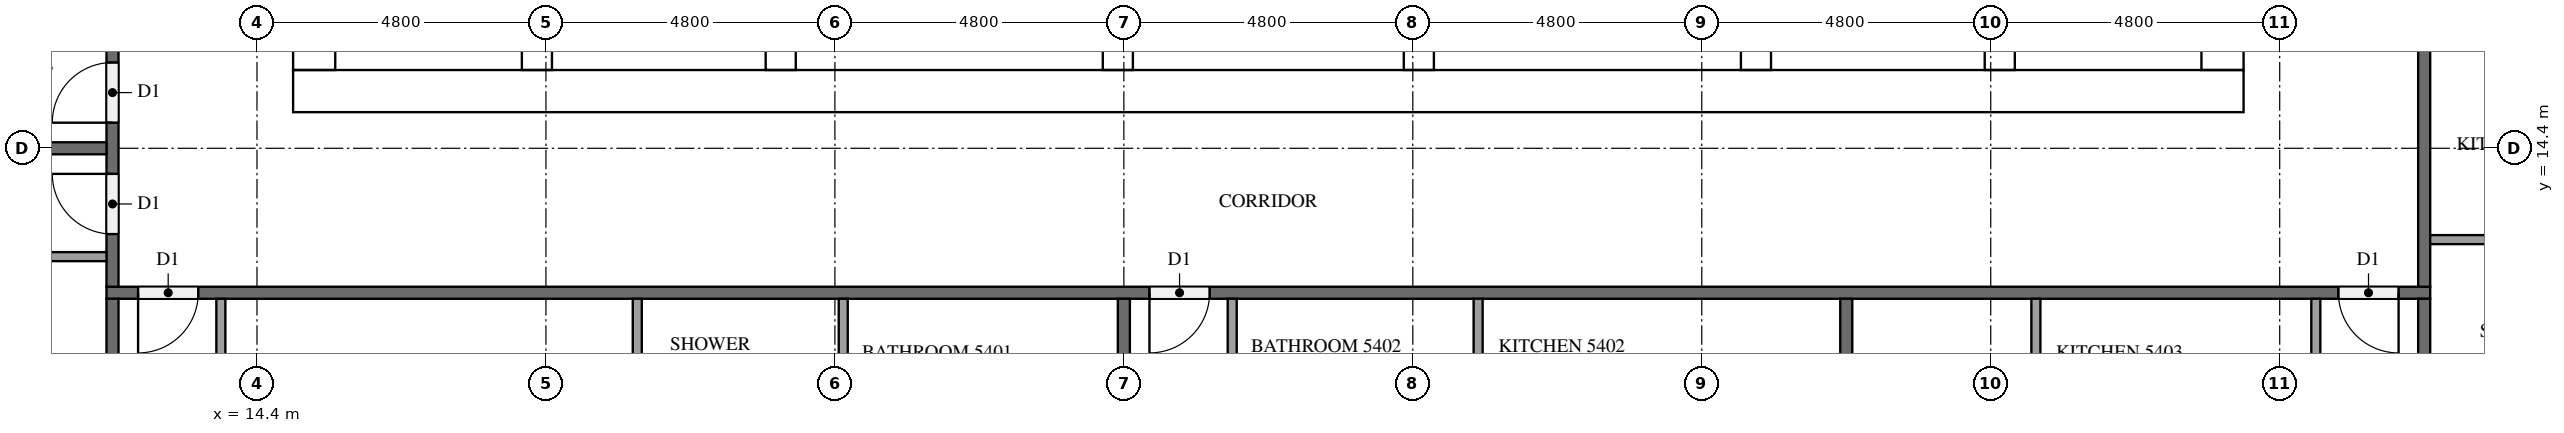
"""IFC4 building model, lengths in metres.
Left out: names, types, materials, properties, quantities, classifications, styles, units other than length and angle.
Written with IfcOpenShell. Run it as: python <this file> out.ifc"""

import sys

from ifc_helpers import new_model, si_unit, direction, frame, frame_2d, origin, place, context, subcontext, project, spatial, rectangle, extrude, element, fill, save


model = new_model("IFC4")
c1 = context("Model", 3, precision=1e-05, world=origin(), true_north=direction((0.0, 1.0)))
c2 = subcontext(c1, "Body", "Model", "MODEL_VIEW")
j1 = project(units=[si_unit("LENGTHUNIT", "METRE"), si_unit("PLANEANGLEUNIT", "RADIAN")], contexts=[c1])
p1 = place(None, origin())
s1 = spatial("IfcSite", under=j1, at=p1, CompositionType="ELEMENT")
p2 = place(p1, origin())
s2 = spatial("IfcBuilding", under=s1, at=p2, CompositionType="ELEMENT")
p3 = place(p2, frame((0.0, 0.0, 208.8)))
s3 = spatial("IfcBuildingStorey", under=s2, at=p3, CompositionType="ELEMENT", Elevation=208.8)
p4 = place(p3, frame((15.0, 15.35, 0.0), z_axis=(0.0, 0.0, 1.0), x_axis=(1.0, 0.0, 0.0)))
e1 = element("IfcWall", 1, at=p4, inside=s3, PredefinedType="SHEAR", context=c2, shape_type="SweptSolid", body=[
    extrude(rectangle(XDim=32.4, YDim=0.7, at=frame_2d((16.2, 0.0))), origin(), (0.0, 0.0, 1.0), 3.2),
])
p5 = place(p4, frame((15.3, 0.0, 0.0)))
e2 = element("IfcOpeningElement", 2, at=p5, cuts=e1, PredefinedType="OPENING", context=c2, shape_type="SweptSolid", body=[
    extrude(rectangle(XDim=1.8, YDim=2.1, at=frame_2d((0.9, 1.05))), frame((0.0, 0.36, 0.0), z_axis=(0.0, -1.0, 0.0), x_axis=(1.0, 0.0, 0.0)), (0.0, 0.0, 1.0), 0.72),
])
p6 = place(p3, frame((15.35, 15.7, 0.0), z_axis=(0.0, 0.0, 1.0), x_axis=(0.0, 1.0, 0.0)))
e3 = element("IfcWall", 3, at=p6, inside=s3, PredefinedType="SHEAR", context=c2, shape_type="SweptSolid", body=[
    extrude(rectangle(XDim=21.4, YDim=0.7, at=frame_2d((10.7, 0.0))), origin(), (0.0, 0.0, 1.0), 3.2),
])
p7 = place(p6, frame((5.06, 0.0, 0.0)))
e4 = element("IfcOpeningElement", 4, at=p7, cuts=e3, PredefinedType="OPENING", context=c2, shape_type="SweptSolid", body=[
    extrude(rectangle(XDim=1.2, YDim=2.1, at=frame_2d((0.6, 1.05))), frame((0.0, 0.36, 0.0), z_axis=(0.0, -1.0, 0.0), x_axis=(1.0, 0.0, 0.0)), (0.0, 0.0, 1.0), 0.72),
])
p8 = place(p3, frame((47.05, 15.7, 0.0), z_axis=(0.0, 0.0, 1.0), x_axis=(0.0, 1.0, 0.0)))
e5 = element("IfcWall", 5, at=p8, inside=s3, PredefinedType="SHEAR", context=c2, shape_type="SweptSolid", body=[
    extrude(rectangle(XDim=21.4, YDim=0.7, at=frame_2d((10.7, 0.0))), origin(), (0.0, 0.0, 1.0), 3.2),
])
p9 = place(p8, frame((10.4, 0.0, 0.0)))
e6 = element("IfcOpeningElement", 6, at=p9, cuts=e5, PredefinedType="OPENING", context=c2, shape_type="SweptSolid", body=[
    extrude(rectangle(XDim=1.2, YDim=2.1, at=frame_2d((0.6, 1.05))), frame((0.0, 0.36, 0.0), z_axis=(0.0, -1.0, 0.0), x_axis=(1.0, 0.0, 0.0)), (0.0, 0.0, 1.0), 0.72),
])
p10 = place(p3, frame((19.05, 15.7, 0.0), z_axis=(0.0, 0.0, 1.0), x_axis=(0.0, 1.0, 0.0)))
e7 = element("IfcWall", 7, at=p10, inside=s3, PredefinedType="SHEAR", context=c2, shape_type="SweptSolid", body=[
    extrude(rectangle(XDim=15.3, YDim=0.5, at=frame_2d((7.65, 0.0))), origin(), (0.0, 0.0, 1.0), 3.2),
])
p11 = place(p10, frame((9.75, 0.0, 0.0)))
e8 = element("IfcOpeningElement", 8, at=p11, cuts=e7, PredefinedType="OPENING", context=c2, shape_type="SweptSolid", body=[
    extrude(rectangle(XDim=1.1, YDim=2.1, at=frame_2d((0.55, 1.05))), frame((0.0, 0.26, 0.0), z_axis=(0.0, -1.0, 0.0), x_axis=(1.0, 0.0, 0.0)), (0.0, 0.0, 1.0), 0.52),
])
p12 = place(p10, frame((13.25, 0.0, 0.0)))
e9 = element("IfcOpeningElement", 9, at=p12, cuts=e7, PredefinedType="OPENING", context=c2, shape_type="SweptSolid", body=[
    extrude(rectangle(XDim=1.1, YDim=2.1, at=frame_2d((0.55, 1.05))), frame((0.0, 0.26, 0.0), z_axis=(0.0, -1.0, 0.0), x_axis=(1.0, 0.0, 0.0)), (0.0, 0.0, 1.0), 0.52),
])
p13 = place(p10, frame((0.5, 0.0, 0.0)))
e10 = element("IfcOpeningElement", 10, at=p13, cuts=e7, PredefinedType="OPENING", context=c2, shape_type="SweptSolid", body=[
    extrude(rectangle(XDim=1.2, YDim=2.1, at=frame_2d((0.6, 1.05))), frame((0.0, 0.26, 0.0), z_axis=(0.0, -1.0, 0.0), x_axis=(1.0, 0.0, 0.0)), (0.0, 0.0, 1.0), 0.52),
])
p14 = place(p3, frame((23.1, 15.7, 0.0), z_axis=(0.0, 0.0, 1.0), x_axis=(0.0, 1.0, 0.0)))
e11 = element("IfcWall", 11, at=p14, inside=s3, PredefinedType="SHEAR", context=c2, shape_type="SweptSolid", body=[
    extrude(rectangle(XDim=21.4, YDim=0.5, at=frame_2d((10.7, 0.0))), origin(), (0.0, 0.0, 1.0), 3.2),
])
p15 = place(p3, frame((39.3, 15.7, 0.0), z_axis=(0.0, 0.0, 1.0), x_axis=(0.0, 1.0, 0.0)))
e12 = element("IfcWall", 12, at=p15, inside=s3, PredefinedType="SHEAR", context=c2, shape_type="SweptSolid", body=[
    extrude(rectangle(XDim=8.55, YDim=0.5, at=frame_2d((4.275, 0.0))), origin(), (0.0, 0.0, 1.0), 3.2),
])
p16 = place(p3, frame((43.35, 15.7, 0.0), z_axis=(0.0, 0.0, 1.0), x_axis=(0.0, 1.0, 0.0)))
e13 = element("IfcWall", 13, at=p16, inside=s3, PredefinedType="SHEAR", context=c2, shape_type="SweptSolid", body=[
    extrude(rectangle(XDim=8.55, YDim=0.5, at=frame_2d((4.275, 0.0))), origin(), (0.0, 0.0, 1.0), 3.2),
])
p17 = place(p16, frame((0.5, 0.0, 0.0)))
e14 = element("IfcOpeningElement", 14, at=p17, cuts=e13, PredefinedType="OPENING", context=c2, shape_type="SweptSolid", body=[
    extrude(rectangle(XDim=1.2, YDim=2.1, at=frame_2d((0.6, 1.05))), frame((0.0, 0.26, 0.0), z_axis=(0.0, -1.0, 0.0), x_axis=(1.0, 0.0, 0.0)), (0.0, 0.0, 1.0), 0.52),
])
for number, where, z_axis, x_axis in (
    (15, (28.7, 15.7, 0.0), (0.0, 0.0, 1.0), (0.0, 1.0, 0.0)),
    (16, (33.7, 15.7, 0.0), (0.0, 0.0, 1.0), (0.0, 1.0, 0.0)),
):
    element("IfcWall", number, at=place(p3, frame(where, z_axis=z_axis, x_axis=x_axis)), inside=s3, PredefinedType="SHEAR", context=c2, shape_type="SweptSolid", body=[
        extrude(rectangle(XDim=2.8, YDim=0.5, at=frame_2d((1.4, 0.0))), origin(), (0.0, 0.0, 1.0), 3.2),
    ])
p18 = place(p3, frame((50.5, 12.0, 0.0), z_axis=(0.0, 0.0, 1.0), x_axis=(-1.0, 0.0, 0.0)))
e17 = element("IfcWall", 17, at=p18, inside=s3, PredefinedType="PARTITIONING", context=c2, shape_type="SweptSolid", body=[
    extrude(rectangle(XDim=38.6, YDim=0.2, at=frame_2d((19.3, 0.0))), origin(), (0.0, 0.0, 1.0), 3.2),
])
p19 = place(p18, frame((37.075, 0.0, 0.0)))
e18 = element("IfcOpeningElement", 18, at=p19, cuts=e17, PredefinedType="OPENING", context=c2, shape_type="SweptSolid", body=[
    extrude(rectangle(XDim=1.0, YDim=2.1, at=frame_2d((0.5, 1.05))), frame((0.0, 0.11, 0.0), z_axis=(0.0, -1.0, 0.0), x_axis=(1.0, 0.0, 0.0)), (0.0, 0.0, 1.0), 0.22),
])
p20 = place(p18, frame((20.275, 0.0, 0.0)))
e19 = element("IfcOpeningElement", 19, at=p20, cuts=e17, PredefinedType="OPENING", context=c2, shape_type="SweptSolid", body=[
    extrude(rectangle(XDim=1.0, YDim=2.1, at=frame_2d((0.5, 1.05))), frame((0.0, 0.11, 0.0), z_axis=(0.0, -1.0, 0.0), x_axis=(1.0, 0.0, 0.0)), (0.0, 0.0, 1.0), 0.22),
])
p21 = place(p18, frame((0.525, 0.0, 0.0)))
e20 = element("IfcOpeningElement", 20, at=p21, cuts=e17, PredefinedType="OPENING", context=c2, shape_type="SweptSolid", body=[
    extrude(rectangle(XDim=1.0, YDim=2.1, at=frame_2d((0.5, 1.05))), frame((0.0, 0.11, 0.0), z_axis=(0.0, -1.0, 0.0), x_axis=(1.0, 0.0, 0.0)), (0.0, 0.0, 1.0), 0.22),
])
p22 = place(p3, frame((50.4, 40.7, 0.0), z_axis=(0.0, 0.0, 1.0), x_axis=(0.0, -1.0, 0.0)))
e21 = element("IfcWall", 21, at=p22, inside=s3, PredefinedType="PARTITIONING", context=c2, shape_type="SweptSolid", body=[
    extrude(rectangle(XDim=28.6, YDim=0.2, at=frame_2d((14.3, 0.0))), origin(), (0.0, 0.0, 1.0), 3.2),
])
p23 = place(p22, frame((19.525, 0.0, 0.0)))
e22 = element("IfcOpeningElement", 22, at=p23, cuts=e21, PredefinedType="OPENING", context=c2, shape_type="SweptSolid", body=[
    extrude(rectangle(XDim=1.0, YDim=2.1, at=frame_2d((0.5, 1.05))), frame((0.0, 0.11, 0.0), z_axis=(0.0, -1.0, 0.0), x_axis=(1.0, 0.0, 0.0)), (0.0, 0.0, 1.0), 0.22),
])
p24 = place(p22, frame((7.525, 0.0, 0.0)))
e23 = element("IfcOpeningElement", 23, at=p24, cuts=e21, PredefinedType="OPENING", context=c2, shape_type="SweptSolid", body=[
    extrude(rectangle(XDim=1.0, YDim=2.1, at=frame_2d((0.5, 1.05))), frame((0.0, 0.11, 0.0), z_axis=(0.0, -1.0, 0.0), x_axis=(1.0, 0.0, 0.0)), (0.0, 0.0, 1.0), 0.22),
])
p25 = place(p22, frame((0.325, 0.0, 0.0)))
e24 = element("IfcOpeningElement", 24, at=p25, cuts=e21, PredefinedType="OPENING", context=c2, shape_type="SweptSolid", body=[
    extrude(rectangle(XDim=1.0, YDim=2.1, at=frame_2d((0.5, 1.05))), frame((0.0, 0.11, 0.0), z_axis=(0.0, -1.0, 0.0), x_axis=(1.0, 0.0, 0.0)), (0.0, 0.0, 1.0), 0.22),
])
p26 = place(p3, frame((12.0, 12.1, 0.0), z_axis=(0.0, 0.0, 1.0), x_axis=(0.0, 1.0, 0.0)))
e25 = element("IfcWall", 25, at=p26, inside=s3, PredefinedType="PARTITIONING", context=c2, shape_type="SweptSolid", body=[
    extrude(rectangle(XDim=28.6, YDim=0.2, at=frame_2d((14.3, 0.0))), origin(), (0.0, 0.0, 1.0), 3.2),
])
p27 = place(p26, frame((27.275, 0.0, 0.0)))
e26 = element("IfcOpeningElement", 26, at=p27, cuts=e25, PredefinedType="OPENING", context=c2, shape_type="SweptSolid", body=[
    extrude(rectangle(XDim=1.0, YDim=2.1, at=frame_2d((0.5, 1.05))), frame((0.0, 0.11, 0.0), z_axis=(0.0, -1.0, 0.0), x_axis=(1.0, 0.0, 0.0)), (0.0, 0.0, 1.0), 0.22),
])
p28 = place(p26, frame((12.325, 0.0, 0.0)))
e27 = element("IfcOpeningElement", 27, at=p28, cuts=e25, PredefinedType="OPENING", context=c2, shape_type="SweptSolid", body=[
    extrude(rectangle(XDim=1.0, YDim=2.1, at=frame_2d((0.5, 1.05))), frame((0.0, 0.11, 0.0), z_axis=(0.0, -1.0, 0.0), x_axis=(1.0, 0.0, 0.0)), (0.0, 0.0, 1.0), 0.22),
])
p29 = place(p26, frame((2.725, 0.0, 0.0)))
e28 = element("IfcOpeningElement", 28, at=p29, cuts=e25, PredefinedType="OPENING", context=c2, shape_type="SweptSolid", body=[
    extrude(rectangle(XDim=1.0, YDim=2.1, at=frame_2d((0.5, 1.05))), frame((0.0, 0.11, 0.0), z_axis=(0.0, -1.0, 0.0), x_axis=(1.0, 0.0, 0.0)), (0.0, 0.0, 1.0), 0.22),
])
p30 = place(p26, frame((0.875, 0.0, 0.0)))
e29 = element("IfcOpeningElement", 29, at=p30, cuts=e25, PredefinedType="OPENING", context=c2, shape_type="SweptSolid", body=[
    extrude(rectangle(XDim=1.0, YDim=2.1, at=frame_2d((0.5, 1.05))), frame((0.0, 0.11, 0.0), z_axis=(0.0, -1.0, 0.0), x_axis=(1.0, 0.0, 0.0)), (0.0, 0.0, 1.0), 0.22),
])
p31 = place(p3, frame((28.8, 11.9, 0.0), z_axis=(0.0, 0.0, 1.0), x_axis=(0.0, -1.0, 0.0)))
e30 = element("IfcWall", 30, at=p31, inside=s3, PredefinedType="PARTITIONING", context=c2, shape_type="SweptSolid", body=[
    extrude(rectangle(XDim=6.775, YDim=0.2, at=frame_2d((3.387, 0.0))), origin(), (0.0, 0.0, 1.0), 3.2),
])
for number, where, z_axis, x_axis in (
    (31, (12.0, 4.9, 0.0), (0.0, 0.0, 1.0), (0.0, 1.0, 0.0)),
    (32, (40.8, 11.9, 0.0), (0.0, 0.0, 1.0), (0.0, -1.0, 0.0)),
    (33, (50.4, 11.9, 0.0), (0.0, 0.0, 1.0), (0.0, -1.0, 0.0)),
    (34, (4.9, 14.4, 0.0), (0.0, 0.0, 1.0), (1.0, 0.0, 0.0)),
):
    element("IfcWall", number, at=place(p3, frame(where, z_axis=z_axis, x_axis=x_axis)), inside=s3, PredefinedType="PARTITIONING", context=c2, shape_type="SweptSolid", body=[
        extrude(rectangle(XDim=7.0, YDim=0.2, at=frame_2d((3.5, 0.0))), origin(), (0.0, 0.0, 1.0), 3.2),
    ])
for number, where, z_axis, x_axis in (
    (35, (20.717, 11.9, 0.0), (0.0, 0.0, 1.0), (0.0, -1.0, 0.0)),
    (36, (24.138, 11.9, 0.0), (0.0, 0.0, 1.0), (0.0, -1.0, 0.0)),
):
    element("IfcWall", number, at=place(p3, frame(where, z_axis=z_axis, x_axis=x_axis)), inside=s3, PredefinedType="PARTITIONING", context=c2, shape_type="SweptSolid", body=[
        extrude(rectangle(XDim=2.225, YDim=0.15, at=frame_2d((1.112, 0.0))), origin(), (0.0, 0.0, 1.0), 3.2),
    ])
p32 = place(p3, frame((13.8, 11.9, 0.0), z_axis=(0.0, 0.0, 1.0), x_axis=(0.0, -1.0, 0.0)))
e37 = element("IfcWall", 37, at=p32, inside=s3, PredefinedType="PARTITIONING", context=c2, shape_type="SweptSolid", body=[
    extrude(rectangle(XDim=2.375, YDim=0.15, at=frame_2d((1.188, 0.0))), origin(), (0.0, 0.0, 1.0), 3.2),
])
p33 = place(p3, frame((34.685, 11.9, 0.0), z_axis=(0.0, 0.0, 1.0), x_axis=(0.0, -1.0, 0.0)))
e38 = element("IfcWall", 38, at=p33, inside=s3, PredefinedType="PARTITIONING", context=c2, shape_type="SweptSolid", body=[
    extrude(rectangle(XDim=1.775, YDim=0.15, at=frame_2d((0.887, 0.0))), origin(), (0.0, 0.0, 1.0), 3.2),
])
p34 = place(p3, frame((30.6, 11.9, 0.0), z_axis=(0.0, 0.0, 1.0), x_axis=(0.0, -1.0, 0.0)))
e39 = element("IfcWall", 39, at=p34, inside=s3, PredefinedType="PARTITIONING", context=c2, shape_type="SweptSolid", body=[
    extrude(rectangle(XDim=1.925, YDim=0.15, at=frame_2d((0.962, 0.0))), origin(), (0.0, 0.0, 1.0), 3.2),
])
p35 = place(p3, frame((43.95, 11.9, 0.0), z_axis=(0.0, 0.0, 1.0), x_axis=(0.0, -1.0, 0.0)))
e40 = element("IfcWall", 40, at=p35, inside=s3, PredefinedType="PARTITIONING", context=c2, shape_type="SweptSolid", body=[
    extrude(rectangle(XDim=2.225, YDim=0.15, at=frame_2d((1.112, 0.0))), origin(), (0.0, 0.0, 1.0), 3.2),
])
p36 = place(p3, frame((48.6, 11.9, 0.0), z_axis=(0.0, 0.0, 1.0), x_axis=(0.0, -1.0, 0.0)))
e41 = element("IfcWall", 41, at=p36, inside=s3, PredefinedType="PARTITIONING", context=c2, shape_type="SweptSolid", body=[
    extrude(rectangle(XDim=2.375, YDim=0.15, at=frame_2d((1.188, 0.0))), origin(), (0.0, 0.0, 1.0), 3.2),
])
p37 = place(p3, frame((50.5, 12.883, 0.0), z_axis=(0.0, 0.0, 1.0), x_axis=(1.0, 0.0, 0.0)))
e42 = element("IfcWall", 42, at=p37, inside=s3, PredefinedType="PARTITIONING", context=c2, shape_type="SweptSolid", body=[
    extrude(rectangle(XDim=2.975, YDim=0.15, at=frame_2d((1.488, 0.0))), origin(), (0.0, 0.0, 1.0), 3.2),
])
p38 = place(p3, frame((11.9, 12.6, 0.0), z_axis=(0.0, 0.0, 1.0), x_axis=(-1.0, 0.0, 0.0)))
e43 = element("IfcWall", 43, at=p38, inside=s3, PredefinedType="PARTITIONING", context=c2, shape_type="SweptSolid", body=[
    extrude(rectangle(XDim=2.225, YDim=0.15, at=frame_2d((1.112, 0.0))), origin(), (0.0, 0.0, 1.0), 3.2),
])
p39 = place(p5, frame((1.8, 0.0, 0.0), z_axis=(0.0, 0.0, 1.0), x_axis=(-1.0, 0.0, 0.0)))
e44 = element("IfcDoor", 44, at=p39, inside=s3, OperationType="DOUBLE_DOOR_SINGLE_SWING", PredefinedType="DOOR", context=c2, shape_type="SweptSolid", body=[
    extrude(rectangle(XDim=1.8, YDim=2.1, at=frame_2d((0.9, 1.05))), frame((0.0, 0.025, 0.0), z_axis=(0.0, -1.0, 0.0), x_axis=(1.0, 0.0, 0.0)), (0.0, 0.0, 1.0), 0.05),
])
fill(e2, e44)
p40 = place(p19, origin())
e45 = element("IfcDoor", 45, at=p40, inside=s3, OperationType="SINGLE_SWING_RIGHT", PredefinedType="DOOR", context=c2, shape_type="SweptSolid", body=[
    extrude(rectangle(XDim=1.0, YDim=2.1, at=frame_2d((0.5, 1.05))), frame((0.0, 0.025, 0.0), z_axis=(0.0, -1.0, 0.0), x_axis=(1.0, 0.0, 0.0)), (0.0, 0.0, 1.0), 0.05),
])
fill(e18, e45)
p41 = place(p20, origin())
e46 = element("IfcDoor", 46, at=p41, inside=s3, OperationType="SINGLE_SWING_RIGHT", PredefinedType="DOOR", context=c2, shape_type="SweptSolid", body=[
    extrude(rectangle(XDim=1.0, YDim=2.1, at=frame_2d((0.5, 1.05))), frame((0.0, 0.025, 0.0), z_axis=(0.0, -1.0, 0.0), x_axis=(1.0, 0.0, 0.0)), (0.0, 0.0, 1.0), 0.05),
])
fill(e19, e46)
p42 = place(p21, origin())
e47 = element("IfcDoor", 47, at=p42, inside=s3, OperationType="SINGLE_SWING_LEFT", PredefinedType="DOOR", context=c2, shape_type="SweptSolid", body=[
    extrude(rectangle(XDim=1.0, YDim=2.1, at=frame_2d((0.5, 1.05))), frame((0.0, 0.025, 0.0), z_axis=(0.0, -1.0, 0.0), x_axis=(1.0, 0.0, 0.0)), (0.0, 0.0, 1.0), 0.05),
])
fill(e20, e47)
p43 = place(p29, origin())
e48 = element("IfcDoor", 48, at=p43, inside=s3, OperationType="SINGLE_SWING_LEFT", PredefinedType="DOOR", context=c2, shape_type="SweptSolid", body=[
    extrude(rectangle(XDim=1.0, YDim=2.1, at=frame_2d((0.5, 1.05))), frame((0.0, 0.025, 0.0), z_axis=(0.0, -1.0, 0.0), x_axis=(1.0, 0.0, 0.0)), (0.0, 0.0, 1.0), 0.05),
])
fill(e28, e48)
p44 = place(p30, origin())
e49 = element("IfcDoor", 49, at=p44, inside=s3, OperationType="SINGLE_SWING_RIGHT", PredefinedType="DOOR", context=c2, shape_type="SweptSolid", body=[
    extrude(rectangle(XDim=1.0, YDim=2.1, at=frame_2d((0.5, 1.05))), frame((0.0, 0.025, 0.0), z_axis=(0.0, -1.0, 0.0), x_axis=(1.0, 0.0, 0.0)), (0.0, 0.0, 1.0), 0.05),
])
fill(e29, e49)
save(model, sys.argv[1])
